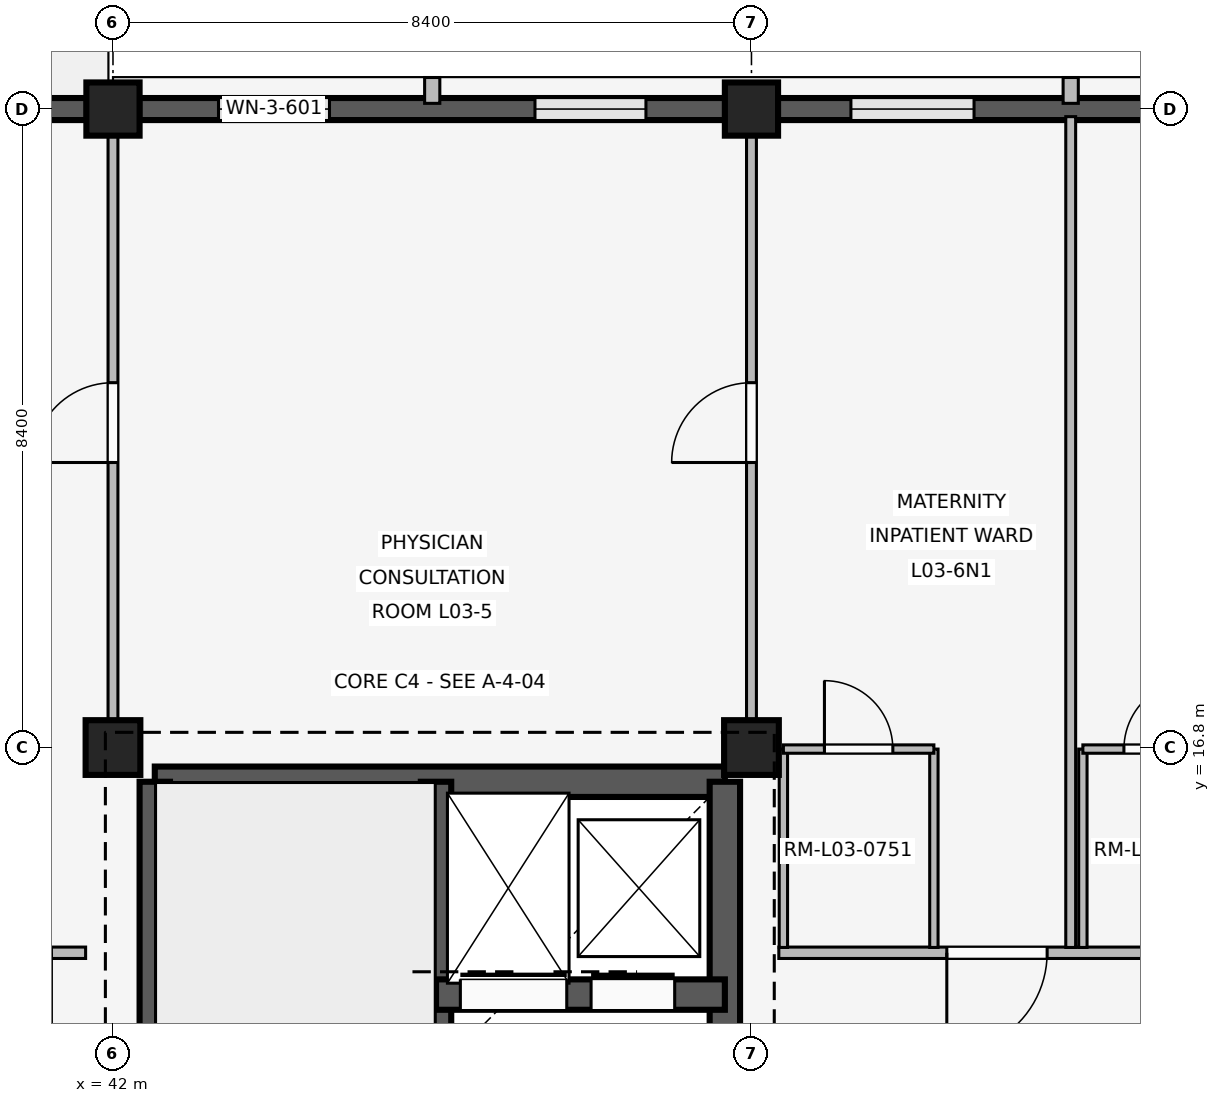
"""IFC4 building model, lengths in metres.
Left out: names, types, materials, properties, quantities, classifications, styles, units other than length and angle.
Written with IfcOpenShell. Run it as: python <this file> out.ifc"""

import sys

from ifc_helpers import new_model, si_unit, direction, frame, frame_2d, origin, origin_2d, place, context, subcontext, project, spatial, rectangle, extrude, element, fill, save


model = new_model("IFC4")
c1 = context("Model", 3, precision=1e-05, world=origin(), true_north=direction((0.0, 1.0)))
c2 = subcontext(c1, "Body", "Model", "MODEL_VIEW")
j1 = project(units=[si_unit("LENGTHUNIT", "METRE"), si_unit("PLANEANGLEUNIT", "RADIAN")], contexts=[c1])
p1 = place(None, origin())
s1 = spatial("IfcSite", under=j1, at=p1, CompositionType="ELEMENT")
p2 = place(p1, origin())
s2 = spatial("IfcBuilding", under=s1, at=p2, CompositionType="ELEMENT")
p3 = place(p2, frame((0.0, 0.0, 12.9)))
s3 = spatial("IfcBuildingStorey", under=s2, at=p3, CompositionType="ELEMENT", Elevation=12.9)
p4 = place(p3, frame((42.0, 16.8, 0.0), z_axis=(0.0, 0.0, 1.0), x_axis=(1.0, 0.0, 0.0)))
e1 = element("IfcColumn", 1, at=p4, inside=s3, PredefinedType="COLUMN", context=c2, shape_type="SweptSolid", body=[
    extrude(rectangle(XDim=0.72, YDim=0.72, at=origin_2d()), origin(), (0.0, 0.0, 1.0), 3.3),
])
p5 = place(p3, frame((42.0, 25.2, 0.0), z_axis=(0.0, 0.0, 1.0), x_axis=(1.0, 0.0, 0.0)))
e2 = element("IfcColumn", 2, at=p5, inside=s3, PredefinedType="COLUMN", context=c2, shape_type="SweptSolid", body=[
    extrude(rectangle(XDim=0.7, YDim=0.7, at=origin_2d()), origin(), (0.0, 0.0, 1.0), 3.3),
])
p6 = place(p3, frame((50.4, 16.8, 0.0), z_axis=(0.0, 0.0, 1.0), x_axis=(1.0, 0.0, 0.0)))
e3 = element("IfcColumn", 3, at=p6, inside=s3, PredefinedType="COLUMN", context=c2, shape_type="SweptSolid", body=[
    extrude(rectangle(XDim=0.72, YDim=0.72, at=origin_2d()), origin(), (0.0, 0.0, 1.0), 3.3),
])
p7 = place(p3, frame((50.4, 25.2, 0.0), z_axis=(0.0, 0.0, 1.0), x_axis=(1.0, 0.0, 0.0)))
e4 = element("IfcColumn", 4, at=p7, inside=s3, PredefinedType="COLUMN", context=c2, shape_type="SweptSolid", body=[
    extrude(rectangle(XDim=0.7, YDim=0.7, at=origin_2d()), origin(), (0.0, 0.0, 1.0), 3.3),
])
p8 = place(p3, frame((33.945, 25.2, 0.0), z_axis=(0.0, 0.0, 1.0), x_axis=(1.0, 0.0, 0.0)))
e5 = element("IfcWall", 5, at=p8, inside=s3, PredefinedType="SOLIDWALL", context=c2, shape_type="SweptSolid", body=[
    extrude(rectangle(XDim=7.71, YDim=0.29, at=frame_2d((3.855, 0.0))), origin(), (0.0, 0.0, 1.0), 2.44),
])
p9 = place(p8, frame((0.963, 0.0, 0.85)))
e6 = element("IfcOpeningElement", 6, at=p9, cuts=e5, PredefinedType="OPENING", context=c2, shape_type="SweptSolid", body=[
    extrude(rectangle(XDim=1.62, YDim=0.95, at=frame_2d((0.81, 0.475))), frame((0.0, 0.155, 0.0), z_axis=(0.0, -1.0, 0.0), x_axis=(1.0, 0.0, 0.0)), (0.0, 0.0, 1.0), 0.31),
])
p10 = place(p8, frame((5.127, 0.0, 0.85)))
e7 = element("IfcOpeningElement", 7, at=p10, cuts=e5, PredefinedType="OPENING", context=c2, shape_type="SweptSolid", body=[
    extrude(rectangle(XDim=1.62, YDim=0.95, at=frame_2d((0.81, 0.475))), frame((0.0, 0.155, 0.0), z_axis=(0.0, -1.0, 0.0), x_axis=(1.0, 0.0, 0.0)), (0.0, 0.0, 1.0), 0.31),
])
p11 = place(p3, frame((42.345, 25.2, 0.0), z_axis=(0.0, 0.0, 1.0), x_axis=(1.0, 0.0, 0.0)))
e8 = element("IfcWall", 8, at=p11, inside=s3, PredefinedType="SOLIDWALL", context=c2, shape_type="SweptSolid", body=[
    extrude(rectangle(XDim=7.71, YDim=0.29, at=frame_2d((3.855, 0.0))), origin(), (0.0, 0.0, 1.0), 2.44),
])
p12 = place(p11, frame((1.043, 0.0, 0.85)))
e9 = element("IfcOpeningElement", 9, at=p12, cuts=e8, PredefinedType="OPENING", context=c2, shape_type="SweptSolid", body=[
    extrude(rectangle(XDim=1.46, YDim=0.85, at=frame_2d((0.73, 0.425))), frame((0.0, 0.155, 0.0), z_axis=(0.0, -1.0, 0.0), x_axis=(1.0, 0.0, 0.0)), (0.0, 0.0, 1.0), 0.31),
])
p13 = place(p11, frame((5.207, 0.0, 0.85)))
e10 = element("IfcOpeningElement", 10, at=p13, cuts=e8, PredefinedType="OPENING", context=c2, shape_type="SweptSolid", body=[
    extrude(rectangle(XDim=1.46, YDim=0.85, at=frame_2d((0.73, 0.425))), frame((0.0, 0.155, 0.0), z_axis=(0.0, -1.0, 0.0), x_axis=(1.0, 0.0, 0.0)), (0.0, 0.0, 1.0), 0.31),
])
p14 = place(p3, frame((46.2, 25.275, 0.0), z_axis=(0.0, 0.0, 1.0), x_axis=(0.0, 1.0, 0.0)))
e11 = element("IfcWall", 11, at=p14, inside=s3, PredefinedType="ELEMENTEDWALL", context=c2, shape_type="SweptSolid", body=[
    extrude(rectangle(XDim=0.34, YDim=0.2, at=frame_2d((0.17, 0.0))), origin(), (0.0, 0.0, 1.0), 2.42),
])
p15 = place(p3, frame((50.745, 25.2, 0.0), z_axis=(0.0, 0.0, 1.0), x_axis=(1.0, 0.0, 0.0)))
e12 = element("IfcWall", 12, at=p15, inside=s3, PredefinedType="SOLIDWALL", context=c2, shape_type="SweptSolid", body=[
    extrude(rectangle(XDim=7.71, YDim=0.29, at=frame_2d((3.855, 0.0))), origin(), (0.0, 0.0, 1.0), 2.44),
])
p16 = place(p15, frame((0.963, 0.0, 0.85)))
e13 = element("IfcOpeningElement", 13, at=p16, cuts=e12, PredefinedType="OPENING", context=c2, shape_type="SweptSolid", body=[
    extrude(rectangle(XDim=1.62, YDim=0.95, at=frame_2d((0.81, 0.475))), frame((0.0, 0.155, 0.0), z_axis=(0.0, -1.0, 0.0), x_axis=(1.0, 0.0, 0.0)), (0.0, 0.0, 1.0), 0.31),
])
p17 = place(p15, frame((5.127, 0.0, 0.85)))
e14 = element("IfcOpeningElement", 14, at=p17, cuts=e12, PredefinedType="OPENING", context=c2, shape_type="SweptSolid", body=[
    extrude(rectangle(XDim=1.62, YDim=0.95, at=frame_2d((0.81, 0.475))), frame((0.0, 0.155, 0.0), z_axis=(0.0, -1.0, 0.0), x_axis=(1.0, 0.0, 0.0)), (0.0, 0.0, 1.0), 0.31),
])
p18 = place(p3, frame((54.6, 25.275, 0.0), z_axis=(0.0, 0.0, 1.0), x_axis=(0.0, 1.0, 0.0)))
e15 = element("IfcWall", 15, at=p18, inside=s3, PredefinedType="ELEMENTEDWALL", context=c2, shape_type="SweptSolid", body=[
    extrude(rectangle(XDim=0.34, YDim=0.2, at=frame_2d((0.17, 0.0))), origin(), (0.0, 0.0, 1.0), 2.42),
])
p19 = place(p3, frame((42.55, 16.35, 0.0), z_axis=(0.0, 0.0, 1.0), x_axis=(1.0, 0.0, 0.0)))
e16 = element("IfcWall", 16, at=p19, inside=s3, PredefinedType="SHEAR", context=c2, shape_type="SweptSolid", body=[
    extrude(rectangle(XDim=7.5, YDim=0.4, at=frame_2d((3.75, 0.0))), origin(), (0.0, 0.0, 1.0), 3.02),
])
p20 = place(p3, frame((42.55, 8.8, 0.0), z_axis=(0.0, 0.0, 1.0), x_axis=(0.0, 1.0, 0.0)))
e17 = element("IfcWall", 17, at=p20, inside=s3, PredefinedType="SHEAR", context=c2, shape_type="SweptSolid", body=[
    extrude(rectangle(XDim=7.55, YDim=0.4, at=frame_2d((3.775, 0.0))), origin(), (0.0, 0.0, 1.0), 3.02),
])
p21 = place(p20, frame((0.28, 0.0, 0.0)))
e18 = element("IfcOpeningElement", 18, at=p21, cuts=e17, PredefinedType="OPENING", context=c2, shape_type="SweptSolid", body=[
    extrude(rectangle(XDim=1.0, YDim=2.15, at=frame_2d((0.5, 1.075))), frame((0.0, 0.21, 0.0), z_axis=(0.0, -1.0, 0.0), x_axis=(1.0, 0.0, 0.0)), (0.0, 0.0, 1.0), 0.42),
])
p22 = place(p3, frame((50.05, 8.8, 0.0), z_axis=(0.0, 0.0, 1.0), x_axis=(0.0, 1.0, 0.0)))
e19 = element("IfcWall", 19, at=p22, inside=s3, PredefinedType="SHEAR", context=c2, shape_type="SweptSolid", body=[
    extrude(rectangle(XDim=7.55, YDim=0.4, at=frame_2d((3.775, 0.0))), origin(), (0.0, 0.0, 1.0), 3.02),
])
p23 = place(p22, frame((2.4, 0.0, 0.0)))
e20 = element("IfcOpeningElement", 20, at=p23, cuts=e19, PredefinedType="OPENING", context=c2, shape_type="SweptSolid", body=[
    extrude(rectangle(XDim=1.2, YDim=2.2, at=frame_2d((0.6, 1.1))), frame((0.0, 0.21, 0.0), z_axis=(0.0, -1.0, 0.0), x_axis=(1.0, 0.0, 0.0)), (0.0, 0.0, 1.0), 0.42),
])
p24 = place(p3, frame((46.25, 8.8, 0.0), z_axis=(0.0, 0.0, 1.0), x_axis=(0.0, 1.0, 0.0)))
e21 = element("IfcWall", 21, at=p24, inside=s3, PredefinedType="SHEAR", context=c2, shape_type="SweptSolid", body=[
    extrude(rectangle(XDim=7.55, YDim=0.4, at=frame_2d((3.775, 0.0))), origin(), (0.0, 0.0, 1.0), 3.02),
])
p25 = place(p24, frame((0.28, 0.0, 0.0)))
e22 = element("IfcOpeningElement", 22, at=p25, cuts=e21, PredefinedType="OPENING", context=c2, shape_type="SweptSolid", body=[
    extrude(rectangle(XDim=1.0, YDim=2.15, at=frame_2d((0.5, 1.075))), frame((0.0, 0.21, 0.0), z_axis=(0.0, -1.0, 0.0), x_axis=(1.0, 0.0, 0.0)), (0.0, 0.0, 1.0), 0.42),
])
p26 = place(p3, frame((46.25, 13.55, 0.0), z_axis=(0.0, 0.0, 1.0), x_axis=(1.0, 0.0, 0.0)))
e23 = element("IfcWall", 23, at=p26, inside=s3, PredefinedType="SHEAR", context=c2, shape_type="SweptSolid", body=[
    extrude(rectangle(XDim=3.8, YDim=0.4, at=frame_2d((1.9, 0.0))), origin(), (0.0, 0.0, 1.0), 3.02),
])
p27 = place(p26, frame((0.32, 0.0, 0.0)))
e24 = element("IfcOpeningElement", 24, at=p27, cuts=e23, PredefinedType="OPENING", context=c2, shape_type="SweptSolid", body=[
    extrude(rectangle(XDim=1.4, YDim=2.25, at=frame_2d((0.7, 1.125))), frame((0.0, 0.21, 0.0), z_axis=(0.0, -1.0, 0.0), x_axis=(1.0, 0.0, 0.0)), (0.0, 0.0, 1.0), 0.42),
])
p28 = place(p26, frame((2.04, 0.0, 0.0)))
e25 = element("IfcOpeningElement", 25, at=p28, cuts=e23, PredefinedType="OPENING", context=c2, shape_type="SweptSolid", body=[
    extrude(rectangle(XDim=1.1, YDim=2.15, at=frame_2d((0.55, 1.075))), frame((0.0, 0.21, 0.0), z_axis=(0.0, -1.0, 0.0), x_axis=(1.0, 0.0, 0.0)), (0.0, 0.0, 1.0), 0.42),
])
p29 = place(p3, frame((41.64, 14.1, 0.0), z_axis=(0.0, 0.0, 1.0), x_axis=(-1.0, 0.0, 0.0)))
e26 = element("IfcWall", 26, at=p29, inside=s3, PredefinedType="PARTITIONING", context=c2, shape_type="SweptSolid", body=[
    extrude(rectangle(XDim=7.96, YDim=0.15, at=frame_2d((3.98, 0.0))), origin(), (0.0, 0.0, 1.0), 2.42),
])
p30 = place(p29, frame((0.45, 0.0, 0.0)))
e27 = element("IfcOpeningElement", 27, at=p30, cuts=e26, PredefinedType="OPENING", context=c2, shape_type="SweptSolid", body=[
    extrude(rectangle(XDim=1.32, YDim=2.25, at=frame_2d((0.66, 1.125))), frame((0.0, 0.085, 0.0), z_axis=(0.0, -1.0, 0.0), x_axis=(1.0, 0.0, 0.0)), (0.0, 0.0, 1.0), 0.17),
])
p31 = place(p29, frame((4.15, 0.0, 0.0)))
e28 = element("IfcOpeningElement", 28, at=p31, cuts=e26, PredefinedType="OPENING", context=c2, shape_type="SweptSolid", body=[
    extrude(rectangle(XDim=1.32, YDim=2.25, at=frame_2d((0.66, 1.125))), frame((0.0, 0.085, 0.0), z_axis=(0.0, -1.0, 0.0), x_axis=(1.0, 0.0, 0.0)), (0.0, 0.0, 1.0), 0.17),
])
p32 = place(p3, frame((42.0, 17.15, 0.0), z_axis=(0.0, 0.0, 1.0), x_axis=(0.0, 1.0, 0.0)))
e29 = element("IfcWall", 29, at=p32, inside=s3, PredefinedType="PARTITIONING", context=c2, shape_type="SweptSolid", body=[
    extrude(rectangle(XDim=7.91, YDim=0.13, at=frame_2d((3.955, 0.0))), origin(), (0.0, 0.0, 1.0), 2.42),
])
p33 = place(p32, frame((3.4, 0.0, 0.0)))
e30 = element("IfcOpeningElement", 30, at=p33, cuts=e29, PredefinedType="OPENING", context=c2, shape_type="SweptSolid", body=[
    extrude(rectangle(XDim=1.05, YDim=2.2, at=frame_2d((0.525, 1.1))), frame((0.0, 0.075, 0.0), z_axis=(0.0, -1.0, 0.0), x_axis=(1.0, 0.0, 0.0)), (0.0, 0.0, 1.0), 0.15),
])
p34 = place(p3, frame((50.4, 17.15, 0.0), z_axis=(0.0, 0.0, 1.0), x_axis=(0.0, 1.0, 0.0)))
e31 = element("IfcWall", 31, at=p34, inside=s3, PredefinedType="PARTITIONING", context=c2, shape_type="SweptSolid", body=[
    extrude(rectangle(XDim=7.91, YDim=0.13, at=frame_2d((3.955, 0.0))), origin(), (0.0, 0.0, 1.0), 2.42),
])
p35 = place(p34, frame((3.4, 0.0, 0.0)))
e32 = element("IfcOpeningElement", 32, at=p35, cuts=e31, PredefinedType="OPENING", context=c2, shape_type="SweptSolid", body=[
    extrude(rectangle(XDim=1.05, YDim=2.2, at=frame_2d((0.525, 1.1))), frame((0.0, 0.075, 0.0), z_axis=(0.0, -1.0, 0.0), x_axis=(1.0, 0.0, 0.0)), (0.0, 0.0, 1.0), 0.15),
])
p36 = place(p3, frame((58.72, 14.1, 0.0), z_axis=(0.0, 0.0, 1.0), x_axis=(-1.0, 0.0, 0.0)))
e33 = element("IfcWall", 33, at=p36, inside=s3, PredefinedType="PARTITIONING", context=c2, shape_type="SweptSolid", body=[
    extrude(rectangle(XDim=7.96, YDim=0.15, at=frame_2d((3.98, 0.0))), origin(), (0.0, 0.0, 1.0), 2.42),
])
p37 = place(p36, frame((0.73, 0.0, 0.0)))
e34 = element("IfcOpeningElement", 34, at=p37, cuts=e33, PredefinedType="OPENING", context=c2, shape_type="SweptSolid", body=[
    extrude(rectangle(XDim=1.32, YDim=2.25, at=frame_2d((0.66, 1.125))), frame((0.0, 0.085, 0.0), z_axis=(0.0, -1.0, 0.0), x_axis=(1.0, 0.0, 0.0)), (0.0, 0.0, 1.0), 0.17),
])
p38 = place(p36, frame((4.43, 0.0, 0.0)))
e35 = element("IfcOpeningElement", 35, at=p38, cuts=e33, PredefinedType="OPENING", context=c2, shape_type="SweptSolid", body=[
    extrude(rectangle(XDim=1.32, YDim=2.25, at=frame_2d((0.66, 1.125))), frame((0.0, 0.085, 0.0), z_axis=(0.0, -1.0, 0.0), x_axis=(1.0, 0.0, 0.0)), (0.0, 0.0, 1.0), 0.17),
])
p39 = place(p3, frame((54.6, 14.17, 0.0), z_axis=(0.0, 0.0, 1.0), x_axis=(0.0, 1.0, 0.0)))
e36 = element("IfcWall", 36, at=p39, inside=s3, PredefinedType="PARTITIONING", context=c2, shape_type="SweptSolid", body=[
    extrude(rectangle(XDim=10.93, YDim=0.13, at=frame_2d((5.465, 0.0))), origin(), (0.0, 0.0, 1.0), 2.42),
])
for number, where, z_axis, x_axis in (
    (37, (50.82, 14.17, 0.0), (0.0, 0.0, 1.0), (0.0, 1.0, 0.0)),
    (38, (52.8, 14.17, 0.0), (0.0, 0.0, 1.0), (0.0, 1.0, 0.0)),
):
    element("IfcWall", number, at=place(p3, frame(where, z_axis=z_axis, x_axis=x_axis)), inside=s3, PredefinedType="PARTITIONING", context=c2, shape_type="SweptSolid", body=[
        extrude(rectangle(XDim=2.61, YDim=0.11, at=frame_2d((1.305, 0.0))), origin(), (0.0, 0.0, 1.0), 2.42),
    ])
p40 = place(p3, frame((50.82, 16.78, 0.0), z_axis=(0.0, 0.0, 1.0), x_axis=(1.0, 0.0, 0.0)))
e39 = element("IfcWall", 39, at=p40, inside=s3, PredefinedType="PARTITIONING", context=c2, shape_type="SweptSolid", body=[
    extrude(rectangle(XDim=1.98, YDim=0.11, at=frame_2d((0.99, 0.0))), origin(), (0.0, 0.0, 1.0), 2.42),
])
p41 = place(p40, frame((0.54, 0.0, 0.0)))
e40 = element("IfcOpeningElement", 40, at=p41, cuts=e39, PredefinedType="OPENING", context=c2, shape_type="SweptSolid", body=[
    extrude(rectangle(XDim=0.9, YDim=2.1, at=frame_2d((0.45, 1.05))), frame((0.0, 0.065, 0.0), z_axis=(0.0, -1.0, 0.0), x_axis=(1.0, 0.0, 0.0)), (0.0, 0.0, 1.0), 0.13),
])
p42 = place(p3, frame((54.76, 14.17, 0.0), z_axis=(0.0, 0.0, 1.0), x_axis=(0.0, 1.0, 0.0)))
e41 = element("IfcWall", 41, at=p42, inside=s3, PredefinedType="PARTITIONING", context=c2, shape_type="SweptSolid", body=[
    extrude(rectangle(XDim=2.61, YDim=0.11, at=frame_2d((1.305, 0.0))), origin(), (0.0, 0.0, 1.0), 2.42),
])
p43 = place(p3, frame((54.76, 16.78, 0.0), z_axis=(0.0, 0.0, 1.0), x_axis=(1.0, 0.0, 0.0)))
e42 = element("IfcWall", 42, at=p43, inside=s3, PredefinedType="PARTITIONING", context=c2, shape_type="SweptSolid", body=[
    extrude(rectangle(XDim=1.98, YDim=0.11, at=frame_2d((0.99, 0.0))), origin(), (0.0, 0.0, 1.0), 2.42),
])
p44 = place(p43, frame((0.54, 0.0, 0.0)))
e43 = element("IfcOpeningElement", 43, at=p44, cuts=e42, PredefinedType="OPENING", context=c2, shape_type="SweptSolid", body=[
    extrude(rectangle(XDim=0.9, YDim=2.1, at=frame_2d((0.45, 1.05))), frame((0.0, 0.065, 0.0), z_axis=(0.0, -1.0, 0.0), x_axis=(1.0, 0.0, 0.0)), (0.0, 0.0, 1.0), 0.13),
])
p45 = place(p12, origin())
e44 = element("IfcWindow", 44, at=p45, inside=s3, PartitioningType="SINGLE_PANEL", PredefinedType="WINDOW", context=c2, shape_type="SweptSolid", body=[
    extrude(rectangle(XDim=1.46, YDim=0.85, at=frame_2d((0.73, 0.425))), frame((0.0, 0.03, 0.0), z_axis=(0.0, -1.0, 0.0), x_axis=(1.0, 0.0, 0.0)), (0.0, 0.0, 1.0), 0.06),
])
fill(e9, e44)
p46 = place(p13, origin())
e45 = element("IfcWindow", 45, at=p46, inside=s3, PartitioningType="SINGLE_PANEL", PredefinedType="WINDOW", context=c2, shape_type="SweptSolid", body=[
    extrude(rectangle(XDim=1.46, YDim=0.85, at=frame_2d((0.73, 0.425))), frame((0.0, 0.03, 0.0), z_axis=(0.0, -1.0, 0.0), x_axis=(1.0, 0.0, 0.0)), (0.0, 0.0, 1.0), 0.06),
])
fill(e10, e45)
p47 = place(p16, origin())
e46 = element("IfcWindow", 46, at=p47, inside=s3, PartitioningType="SINGLE_PANEL", PredefinedType="WINDOW", context=c2, shape_type="SweptSolid", body=[
    extrude(rectangle(XDim=1.62, YDim=0.95, at=frame_2d((0.81, 0.475))), frame((0.0, 0.03, 0.0), z_axis=(0.0, -1.0, 0.0), x_axis=(1.0, 0.0, 0.0)), (0.0, 0.0, 1.0), 0.06),
])
fill(e13, e46)
p48 = place(p27, origin())
e47 = element("IfcDoor", 47, at=p48, inside=s3, OperationType="SLIDING_TO_LEFT", PredefinedType="DOOR", context=c2, shape_type="SweptSolid", body=[
    extrude(rectangle(XDim=1.4, YDim=2.25, at=frame_2d((0.7, 1.125))), frame((0.0, 0.025, 0.0), z_axis=(0.0, -1.0, 0.0), x_axis=(1.0, 0.0, 0.0)), (0.0, 0.0, 1.0), 0.05),
])
fill(e24, e47)
p49 = place(p28, origin())
e48 = element("IfcDoor", 48, at=p49, inside=s3, OperationType="SLIDING_TO_LEFT", PredefinedType="DOOR", context=c2, shape_type="SweptSolid", body=[
    extrude(rectangle(XDim=1.1, YDim=2.15, at=frame_2d((0.55, 1.075))), frame((0.0, 0.025, 0.0), z_axis=(0.0, -1.0, 0.0), x_axis=(1.0, 0.0, 0.0)), (0.0, 0.0, 1.0), 0.05),
])
fill(e25, e48)
p50 = place(p33, origin())
e49 = element("IfcDoor", 49, at=p50, inside=s3, OperationType="SINGLE_SWING_LEFT", PredefinedType="DOOR", context=c2, shape_type="SweptSolid", body=[
    extrude(rectangle(XDim=1.05, YDim=2.2, at=frame_2d((0.525, 1.1))), frame((0.0, 0.025, 0.0), z_axis=(0.0, -1.0, 0.0), x_axis=(1.0, 0.0, 0.0)), (0.0, 0.0, 1.0), 0.05),
])
fill(e30, e49)
p51 = place(p35, origin())
e50 = element("IfcDoor", 50, at=p51, inside=s3, OperationType="SINGLE_SWING_LEFT", PredefinedType="DOOR", context=c2, shape_type="SweptSolid", body=[
    extrude(rectangle(XDim=1.05, YDim=2.2, at=frame_2d((0.525, 1.1))), frame((0.0, 0.025, 0.0), z_axis=(0.0, -1.0, 0.0), x_axis=(1.0, 0.0, 0.0)), (0.0, 0.0, 1.0), 0.05),
])
fill(e32, e50)
p52 = place(p38, origin())
e51 = element("IfcDoor", 51, at=p52, inside=s3, OperationType="SINGLE_SWING_RIGHT", PredefinedType="DOOR", context=c2, shape_type="SweptSolid", body=[
    extrude(rectangle(XDim=1.32, YDim=2.25, at=frame_2d((0.66, 1.125))), frame((0.0, 0.025, 0.0), z_axis=(0.0, -1.0, 0.0), x_axis=(1.0, 0.0, 0.0)), (0.0, 0.0, 1.0), 0.05),
])
fill(e35, e51)
p53 = place(p41, origin())
e52 = element("IfcDoor", 52, at=p53, inside=s3, OperationType="SINGLE_SWING_LEFT", PredefinedType="DOOR", context=c2, shape_type="SweptSolid", body=[
    extrude(rectangle(XDim=0.9, YDim=2.1, at=frame_2d((0.45, 1.05))), frame((0.0, 0.025, 0.0), z_axis=(0.0, -1.0, 0.0), x_axis=(1.0, 0.0, 0.0)), (0.0, 0.0, 1.0), 0.05),
])
fill(e40, e52)
p54 = place(p44, origin())
e53 = element("IfcDoor", 53, at=p54, inside=s3, OperationType="SINGLE_SWING_RIGHT", PredefinedType="DOOR", context=c2, shape_type="SweptSolid", body=[
    extrude(rectangle(XDim=0.9, YDim=2.1, at=frame_2d((0.45, 1.05))), frame((0.0, 0.025, 0.0), z_axis=(0.0, -1.0, 0.0), x_axis=(1.0, 0.0, 0.0)), (0.0, 0.0, 1.0), 0.05),
])
fill(e43, e53)
save(model, sys.argv[1])
